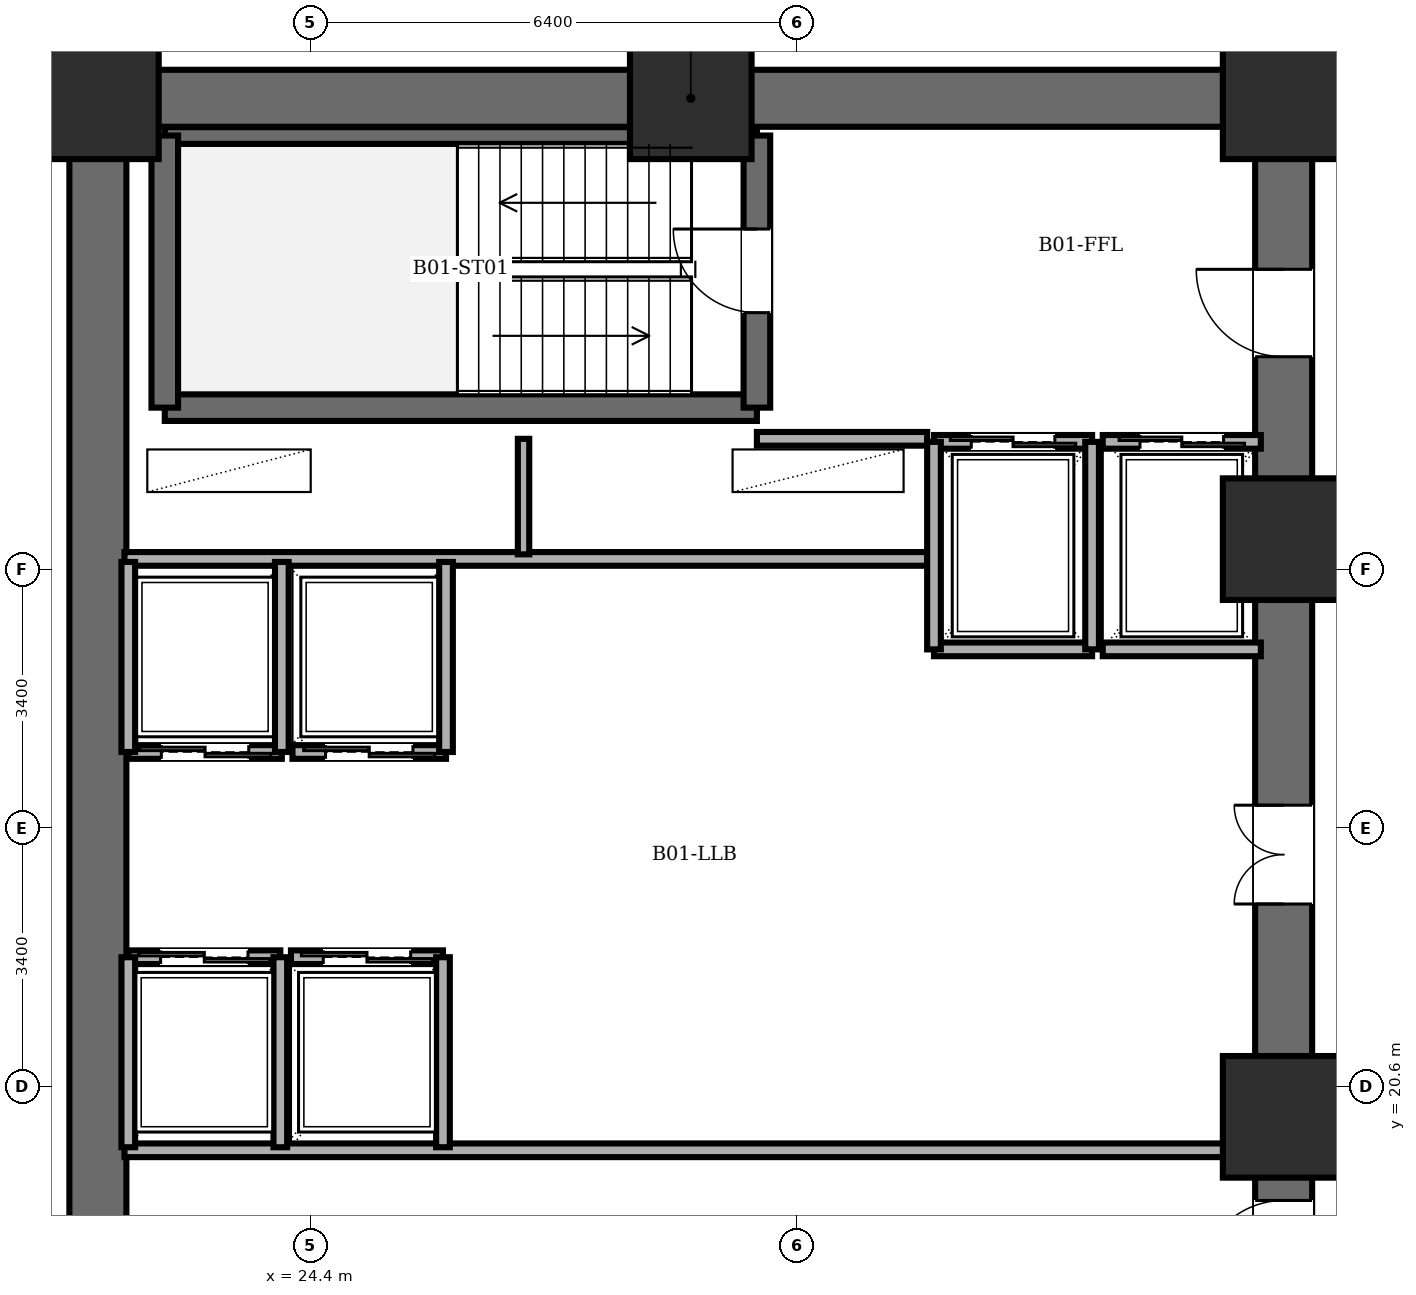
"""IFC4 building model, lengths in metres.
Left out: names, types, materials, properties, quantities, classifications, styles, units other than length and angle.
Written with IfcOpenShell. Run it as: python <this file> out.ifc"""

import sys

from ifc_helpers import new_model, si_unit, direction, frame, frame_2d, origin, origin_2d, place, context, subcontext, project, spatial, rectangle, extrude, element, fill, save


model = new_model("IFC4")
c1 = context("Model", 3, precision=1e-05, world=origin(), true_north=direction((0.0, 1.0)))
c2 = subcontext(c1, "Body", "Model", "MODEL_VIEW")
j1 = project(units=[si_unit("LENGTHUNIT", "METRE"), si_unit("PLANEANGLEUNIT", "RADIAN")], contexts=[c1])
p1 = place(None, origin())
s1 = spatial("IfcSite", under=j1, at=p1, CompositionType="ELEMENT")
p2 = place(p1, origin())
s2 = spatial("IfcBuilding", under=s1, at=p2, CompositionType="ELEMENT")
p3 = place(p2, frame((0.0, 0.0, -4.2)))
s3 = spatial("IfcBuildingStorey", under=s2, at=p3, CompositionType="ELEMENT", Elevation=-4.2)
for number, where, z_axis, x_axis in (
    (1, (37.2, 20.2, 0.0), (0.0, 0.0, 1.0), (1.0, 0.0, 0.0)),
    (2, (37.2, 27.8, 0.0), (0.0, 0.0, 1.0), (1.0, 0.0, 0.0)),
    (3, (37.2, 33.6, 0.0), (0.0, 0.0, 1.0), (1.0, 0.0, 0.0)),
    (4, (29.4, 33.6, 0.0), (0.0, 0.0, 1.0), (1.0, 0.0, 0.0)),
    (5, (21.6, 33.6, 0.0), (0.0, 0.0, 1.0), (1.0, 0.0, 0.0)),
):
    element("IfcColumn", number, at=place(p3, frame(where, z_axis=z_axis, x_axis=x_axis)), inside=s3, PredefinedType="COLUMN", context=c2, shape_type="SweptSolid", body=[
        extrude(rectangle(XDim=1.6, YDim=1.6, at=origin_2d()), origin(), (0.0, 0.0, 1.0), 4.2),
    ])
p4 = place(p3, frame((21.6, 14.4, 0.0), z_axis=(0.0, 0.0, 1.0), x_axis=(0.0, 1.0, 0.0)))
e6 = element("IfcWall", 6, at=p4, inside=s3, PredefinedType="SHEAR", context=c2, shape_type="SweptSolid", body=[
    extrude(rectangle(XDim=19.2, YDim=0.75, at=frame_2d((9.6, 0.0))), origin(), (0.0, 0.0, 1.0), 3.96),
])
p5 = place(p3, frame((21.6, 33.6, 0.0), z_axis=(0.0, 0.0, 1.0), x_axis=(1.0, 0.0, 0.0)))
e7 = element("IfcWall", 7, at=p5, inside=s3, PredefinedType="SHEAR", context=c2, shape_type="SweptSolid", body=[
    extrude(rectangle(XDim=15.6, YDim=0.75, at=frame_2d((7.8, 0.0))), origin(), (0.0, 0.0, 1.0), 3.96),
])
p6 = place(p3, frame((37.2, 14.4, 0.0), z_axis=(0.0, 0.0, 1.0), x_axis=(0.0, 1.0, 0.0)))
e8 = element("IfcWall", 8, at=p6, inside=s3, PredefinedType="SHEAR", context=c2, shape_type="SweptSolid", body=[
    extrude(rectangle(XDim=19.2, YDim=0.75, at=frame_2d((9.6, 0.0))), origin(), (0.0, 0.0, 1.0), 3.96),
])
p7 = place(p6, frame((15.8, 0.0, 0.0)))
e9 = element("IfcOpeningElement", 9, at=p7, cuts=e8, PredefinedType="OPENING", context=c2, shape_type="SweptSolid", body=[
    extrude(rectangle(XDim=1.15, YDim=2.15, at=frame_2d((0.575, 1.075))), frame((0.0, 0.385, 0.0), z_axis=(0.0, -1.0, 0.0), x_axis=(1.0, 0.0, 0.0)), (0.0, 0.0, 1.0), 0.77),
])
p8 = place(p6, frame((3.6, 0.0, 0.0)))
e10 = element("IfcOpeningElement", 10, at=p8, cuts=e8, PredefinedType="OPENING", context=c2, shape_type="SweptSolid", body=[
    extrude(rectangle(XDim=1.1, YDim=2.15, at=frame_2d((0.55, 1.075))), frame((0.0, 0.385, 0.0), z_axis=(0.0, -1.0, 0.0), x_axis=(1.0, 0.0, 0.0)), (0.0, 0.0, 1.0), 0.77),
])
p9 = place(p6, frame((8.6, 0.0, 0.0)))
e11 = element("IfcOpeningElement", 11, at=p9, cuts=e8, PredefinedType="OPENING", context=c2, shape_type="SweptSolid", body=[
    extrude(rectangle(XDim=1.3, YDim=2.2, at=frame_2d((0.65, 1.1))), frame((0.0, 0.385, 0.0), z_axis=(0.0, -1.0, 0.0), x_axis=(1.0, 0.0, 0.0)), (0.0, 0.0, 1.0), 0.77),
])
p10 = place(p3, frame((22.48, 29.53, 0.0), z_axis=(0.0, 0.0, 1.0), x_axis=(1.0, 0.0, 0.0)))
e12 = element("IfcWall", 12, at=p10, inside=s3, PredefinedType="SOLIDWALL", context=c2, shape_type="SweptSolid", body=[
    extrude(rectangle(XDim=7.79, YDim=0.35, at=frame_2d((3.895, 0.0))), origin(), (0.0, 0.0, 1.0), 3.96),
])
p11 = place(p3, frame((22.48, 33.11, 0.0), z_axis=(0.0, 0.0, 1.0), x_axis=(1.0, 0.0, 0.0)))
e13 = element("IfcWall", 13, at=p11, inside=s3, PredefinedType="PARTITIONING", context=c2, shape_type="SweptSolid", body=[
    extrude(rectangle(XDim=7.79, YDim=0.22, at=frame_2d((3.895, 0.0))), origin(), (0.0, 0.0, 1.0), 3.96),
])
p12 = place(p3, frame((22.48, 29.53, 0.0), z_axis=(0.0, 0.0, 1.0), x_axis=(0.0, 1.0, 0.0)))
e14 = element("IfcWall", 14, at=p12, inside=s3, PredefinedType="SOLIDWALL", context=c2, shape_type="SweptSolid", body=[
    extrude(rectangle(XDim=3.58, YDim=0.35, at=frame_2d((1.79, 0.0))), origin(), (0.0, 0.0, 1.0), 3.96),
])
p13 = place(p3, frame((30.27, 29.53, 0.0), z_axis=(0.0, 0.0, 1.0), x_axis=(0.0, 1.0, 0.0)))
e15 = element("IfcWall", 15, at=p13, inside=s3, PredefinedType="SOLIDWALL", context=c2, shape_type="SweptSolid", body=[
    extrude(rectangle(XDim=3.58, YDim=0.35, at=frame_2d((1.79, 0.0))), origin(), (0.0, 0.0, 1.0), 3.96),
])
p14 = place(p13, frame((1.25, 0.0, 0.0)))
e16 = element("IfcOpeningElement", 16, at=p14, cuts=e15, PredefinedType="OPENING", context=c2, shape_type="SweptSolid", body=[
    extrude(rectangle(XDim=1.1, YDim=2.15, at=frame_2d((0.55, 1.075))), frame((0.0, 0.185, 0.0), z_axis=(0.0, -1.0, 0.0), x_axis=(1.0, 0.0, 0.0)), (0.0, 0.0, 1.0), 0.37),
])
p15 = place(p3, frame((30.27, 29.12, 0.0), z_axis=(0.0, 0.0, 1.0), x_axis=(1.0, 0.0, 0.0)))
e17 = element("IfcWall", 17, at=p15, inside=s3, PredefinedType="PARTITIONING", context=c2, shape_type="SweptSolid", body=[
    extrude(rectangle(XDim=2.24, YDim=0.18, at=frame_2d((1.12, 0.0))), origin(), (0.0, 0.0, 1.0), 3.96),
])
p16 = place(p3, frame((21.95, 27.54, 0.0), z_axis=(0.0, 0.0, 1.0), x_axis=(1.0, 0.0, 0.0)))
e18 = element("IfcWall", 18, at=p16, inside=s3, PredefinedType="PARTITIONING", context=c2, shape_type="SweptSolid", body=[
    extrude(rectangle(XDim=10.56, YDim=0.18, at=frame_2d((5.28, 0.0))), origin(), (0.0, 0.0, 1.0), 3.96),
])
p17 = place(p3, frame((27.2, 27.6, 0.0), z_axis=(0.0, 0.0, 1.0), x_axis=(0.0, 1.0, 0.0)))
e19 = element("IfcWall", 19, at=p17, inside=s3, PredefinedType="PARTITIONING", context=c2, shape_type="SweptSolid", body=[
    extrude(rectangle(XDim=1.52, YDim=0.15, at=frame_2d((0.76, 0.0))), origin(), (0.0, 0.0, 1.0), 3.96),
])
p18 = place(p3, frame((21.95, 19.76, 0.0), z_axis=(0.0, 0.0, 1.0), x_axis=(1.0, 0.0, 0.0)))
e20 = element("IfcWall", 20, at=p18, inside=s3, PredefinedType="PARTITIONING", context=c2, shape_type="SweptSolid", body=[
    extrude(rectangle(XDim=14.87, YDim=0.18, at=frame_2d((7.435, 0.0))), origin(), (0.0, 0.0, 1.0), 3.96),
])
p19 = place(p3, frame((32.6, 29.08, 0.0), z_axis=(0.0, 0.0, 1.0), x_axis=(1.0, 0.0, 0.0)))
e21 = element("IfcWall", 21, at=p19, inside=s3, PredefinedType="PARTITIONING", context=c2, shape_type="SweptSolid", body=[
    extrude(rectangle(XDim=2.08, YDim=0.18, at=frame_2d((1.04, 0.0))), origin(), (0.0, 0.0, 1.0), 3.96),
])
p20 = place(p19, frame((0.49, 0.0, 0.0)))
e22 = element("IfcOpeningElement", 22, at=p20, cuts=e21, PredefinedType="OPENING", context=c2, shape_type="SweptSolid", body=[
    extrude(rectangle(XDim=1.1, YDim=2.2, at=frame_2d((0.55, 1.1))), frame((0.0, 0.1, 0.0), z_axis=(0.0, -1.0, 0.0), x_axis=(1.0, 0.0, 0.0)), (0.0, 0.0, 1.0), 0.2),
])
p21 = place(p3, frame((34.68, 26.35, 0.0), z_axis=(0.0, 0.0, 1.0), x_axis=(-1.0, 0.0, 0.0)))
e23 = element("IfcWall", 23, at=p21, inside=s3, PredefinedType="PARTITIONING", context=c2, shape_type="SweptSolid", body=[
    extrude(rectangle(XDim=2.08, YDim=0.18, at=frame_2d((1.04, 0.0))), origin(), (0.0, 0.0, 1.0), 3.96),
])
for number, where, z_axis, x_axis in (
    (24, (34.68, 26.35, 0.0), (0.0, 0.0, 1.0), (0.0, 1.0, 0.0)),
    (25, (32.6, 29.08, 0.0), (0.0, 0.0, 1.0), (0.0, -1.0, 0.0)),
):
    element("IfcWall", number, at=place(p3, frame(where, z_axis=z_axis, x_axis=x_axis)), inside=s3, PredefinedType="PARTITIONING", context=c2, shape_type="SweptSolid", body=[
        extrude(rectangle(XDim=2.73, YDim=0.18, at=frame_2d((1.365, 0.0))), origin(), (0.0, 0.0, 1.0), 3.96),
    ])
p22 = place(p3, frame((34.82, 29.08, 0.0), z_axis=(0.0, 0.0, 1.0), x_axis=(1.0, 0.0, 0.0)))
e26 = element("IfcWall", 26, at=p22, inside=s3, PredefinedType="PARTITIONING", context=c2, shape_type="SweptSolid", body=[
    extrude(rectangle(XDim=2.08, YDim=0.18, at=frame_2d((1.04, 0.0))), origin(), (0.0, 0.0, 1.0), 3.96),
])
p23 = place(p22, frame((0.49, 0.0, 0.0)))
e27 = element("IfcOpeningElement", 27, at=p23, cuts=e26, PredefinedType="OPENING", context=c2, shape_type="SweptSolid", body=[
    extrude(rectangle(XDim=1.1, YDim=2.2, at=frame_2d((0.55, 1.1))), frame((0.0, 0.1, 0.0), z_axis=(0.0, -1.0, 0.0), x_axis=(1.0, 0.0, 0.0)), (0.0, 0.0, 1.0), 0.2),
])
p24 = place(p3, frame((36.9, 26.35, 0.0), z_axis=(0.0, 0.0, 1.0), x_axis=(-1.0, 0.0, 0.0)))
e28 = element("IfcWall", 28, at=p24, inside=s3, PredefinedType="PARTITIONING", context=c2, shape_type="SweptSolid", body=[
    extrude(rectangle(XDim=2.08, YDim=0.18, at=frame_2d((1.04, 0.0))), origin(), (0.0, 0.0, 1.0), 3.96),
])
p25 = place(p3, frame((24.02, 25.0, 0.0), z_axis=(0.0, 0.0, 1.0), x_axis=(-1.0, 0.0, 0.0)))
e29 = element("IfcWall", 29, at=p25, inside=s3, PredefinedType="PARTITIONING", context=c2, shape_type="SweptSolid", body=[
    extrude(rectangle(XDim=2.02, YDim=0.18, at=frame_2d((1.01, 0.0))), origin(), (0.0, 0.0, 1.0), 3.96),
])
p26 = place(p25, frame((0.435, 0.0, 0.0)))
e30 = element("IfcOpeningElement", 30, at=p26, cuts=e29, PredefinedType="OPENING", context=c2, shape_type="SweptSolid", body=[
    extrude(rectangle(XDim=1.15, YDim=2.2, at=frame_2d((0.575, 1.1))), frame((0.0, 0.1, 0.0), z_axis=(0.0, -1.0, 0.0), x_axis=(1.0, 0.0, 0.0)), (0.0, 0.0, 1.0), 0.2),
])
for number, where, z_axis, x_axis in (
    (31, (24.02, 25.0, 0.0), (0.0, 0.0, 1.0), (0.0, 1.0, 0.0)),
    (32, (22.0, 27.5, 0.0), (0.0, 0.0, 1.0), (0.0, -1.0, 0.0)),
):
    element("IfcWall", number, at=place(p3, frame(where, z_axis=z_axis, x_axis=x_axis)), inside=s3, PredefinedType="PARTITIONING", context=c2, shape_type="SweptSolid", body=[
        extrude(rectangle(XDim=2.5, YDim=0.18, at=frame_2d((1.25, 0.0))), origin(), (0.0, 0.0, 1.0), 3.96),
    ])
p27 = place(p3, frame((26.18, 25.0, 0.0), z_axis=(0.0, 0.0, 1.0), x_axis=(-1.0, 0.0, 0.0)))
e33 = element("IfcWall", 33, at=p27, inside=s3, PredefinedType="PARTITIONING", context=c2, shape_type="SweptSolid", body=[
    extrude(rectangle(XDim=2.02, YDim=0.18, at=frame_2d((1.01, 0.0))), origin(), (0.0, 0.0, 1.0), 3.96),
])
p28 = place(p27, frame((0.435, 0.0, 0.0)))
e34 = element("IfcOpeningElement", 34, at=p28, cuts=e33, PredefinedType="OPENING", context=c2, shape_type="SweptSolid", body=[
    extrude(rectangle(XDim=1.15, YDim=2.2, at=frame_2d((0.575, 1.1))), frame((0.0, 0.1, 0.0), z_axis=(0.0, -1.0, 0.0), x_axis=(1.0, 0.0, 0.0)), (0.0, 0.0, 1.0), 0.2),
])
p29 = place(p3, frame((26.18, 25.0, 0.0), z_axis=(0.0, 0.0, 1.0), x_axis=(0.0, 1.0, 0.0)))
e35 = element("IfcWall", 35, at=p29, inside=s3, PredefinedType="PARTITIONING", context=c2, shape_type="SweptSolid", body=[
    extrude(rectangle(XDim=2.5, YDim=0.18, at=frame_2d((1.25, 0.0))), origin(), (0.0, 0.0, 1.0), 3.96),
])
p30 = place(p3, frame((22.0, 22.3, 0.0), z_axis=(0.0, 0.0, 1.0), x_axis=(1.0, 0.0, 0.0)))
e36 = element("IfcWall", 36, at=p30, inside=s3, PredefinedType="PARTITIONING", context=c2, shape_type="SweptSolid", body=[
    extrude(rectangle(XDim=2.0, YDim=0.18, at=frame_2d((1.0, 0.0))), origin(), (0.0, 0.0, 1.0), 3.96),
])
p31 = place(p30, frame((0.425, 0.0, 0.0)))
e37 = element("IfcOpeningElement", 37, at=p31, cuts=e36, PredefinedType="OPENING", context=c2, shape_type="SweptSolid", body=[
    extrude(rectangle(XDim=1.15, YDim=2.2, at=frame_2d((0.575, 1.1))), frame((0.0, 0.1, 0.0), z_axis=(0.0, -1.0, 0.0), x_axis=(1.0, 0.0, 0.0)), (0.0, 0.0, 1.0), 0.2),
])
for number, where, z_axis, x_axis in (
    (38, (24.0, 19.8, 0.0), (0.0, 0.0, 1.0), (0.0, 1.0, 0.0)),
    (39, (22.0, 22.3, 0.0), (0.0, 0.0, 1.0), (0.0, -1.0, 0.0)),
):
    element("IfcWall", number, at=place(p3, frame(where, z_axis=z_axis, x_axis=x_axis)), inside=s3, PredefinedType="PARTITIONING", context=c2, shape_type="SweptSolid", body=[
        extrude(rectangle(XDim=2.5, YDim=0.18, at=frame_2d((1.25, 0.0))), origin(), (0.0, 0.0, 1.0), 3.96),
    ])
p32 = place(p3, frame((24.14, 22.3, 0.0), z_axis=(0.0, 0.0, 1.0), x_axis=(1.0, 0.0, 0.0)))
e40 = element("IfcWall", 40, at=p32, inside=s3, PredefinedType="PARTITIONING", context=c2, shape_type="SweptSolid", body=[
    extrude(rectangle(XDim=2.0, YDim=0.18, at=frame_2d((1.0, 0.0))), origin(), (0.0, 0.0, 1.0), 3.96),
])
p33 = place(p32, frame((0.425, 0.0, 0.0)))
e41 = element("IfcOpeningElement", 41, at=p33, cuts=e40, PredefinedType="OPENING", context=c2, shape_type="SweptSolid", body=[
    extrude(rectangle(XDim=1.15, YDim=2.2, at=frame_2d((0.575, 1.1))), frame((0.0, 0.1, 0.0), z_axis=(0.0, -1.0, 0.0), x_axis=(1.0, 0.0, 0.0)), (0.0, 0.0, 1.0), 0.2),
])
p34 = place(p3, frame((26.14, 19.8, 0.0), z_axis=(0.0, 0.0, 1.0), x_axis=(0.0, 1.0, 0.0)))
e42 = element("IfcWall", 42, at=p34, inside=s3, PredefinedType="PARTITIONING", context=c2, shape_type="SweptSolid", body=[
    extrude(rectangle(XDim=2.5, YDim=0.18, at=frame_2d((1.25, 0.0))), origin(), (0.0, 0.0, 1.0), 3.96),
])
p35 = place(p14, origin())
e43 = element("IfcDoor", 43, at=p35, inside=s3, OperationType="SINGLE_SWING_RIGHT", PredefinedType="DOOR", context=c2, shape_type="SweptSolid", body=[
    extrude(rectangle(XDim=1.1, YDim=2.15, at=frame_2d((0.55, 1.075))), frame((0.0, 0.025, 0.0), z_axis=(0.0, -1.0, 0.0), x_axis=(1.0, 0.0, 0.0)), (0.0, 0.0, 1.0), 0.05),
])
fill(e16, e43)
p36 = place(p7, origin())
e44 = element("IfcDoor", 44, at=p36, inside=s3, OperationType="SINGLE_SWING_RIGHT", PredefinedType="DOOR", context=c2, shape_type="SweptSolid", body=[
    extrude(rectangle(XDim=1.15, YDim=2.15, at=frame_2d((0.575, 1.075))), frame((0.0, 0.025, 0.0), z_axis=(0.0, -1.0, 0.0), x_axis=(1.0, 0.0, 0.0)), (0.0, 0.0, 1.0), 0.05),
])
fill(e9, e44)
p37 = place(p8, origin())
e45 = element("IfcDoor", 45, at=p37, inside=s3, OperationType="SINGLE_SWING_LEFT", PredefinedType="DOOR", context=c2, shape_type="SweptSolid", body=[
    extrude(rectangle(XDim=1.1, YDim=2.15, at=frame_2d((0.55, 1.075))), frame((0.0, 0.025, 0.0), z_axis=(0.0, -1.0, 0.0), x_axis=(1.0, 0.0, 0.0)), (0.0, 0.0, 1.0), 0.05),
])
fill(e10, e45)
p38 = place(p20, origin())
e46 = element("IfcDoor", 46, at=p38, inside=s3, OperationType="DOUBLE_DOOR_SLIDING", PredefinedType="DOOR", context=c2, shape_type="SweptSolid", body=[
    extrude(rectangle(XDim=1.1, YDim=2.2, at=frame_2d((0.55, 1.1))), frame((0.0, 0.025, 0.0), z_axis=(0.0, -1.0, 0.0), x_axis=(1.0, 0.0, 0.0)), (0.0, 0.0, 1.0), 0.05),
])
fill(e22, e46)
p39 = place(p23, origin())
e47 = element("IfcDoor", 47, at=p39, inside=s3, OperationType="DOUBLE_DOOR_SLIDING", PredefinedType="DOOR", context=c2, shape_type="SweptSolid", body=[
    extrude(rectangle(XDim=1.1, YDim=2.2, at=frame_2d((0.55, 1.1))), frame((0.0, 0.025, 0.0), z_axis=(0.0, -1.0, 0.0), x_axis=(1.0, 0.0, 0.0)), (0.0, 0.0, 1.0), 0.05),
])
fill(e27, e47)
p40 = place(p26, origin())
e48 = element("IfcDoor", 48, at=p40, inside=s3, OperationType="DOUBLE_DOOR_SLIDING", PredefinedType="DOOR", context=c2, shape_type="SweptSolid", body=[
    extrude(rectangle(XDim=1.15, YDim=2.2, at=frame_2d((0.575, 1.1))), frame((0.0, 0.025, 0.0), z_axis=(0.0, -1.0, 0.0), x_axis=(1.0, 0.0, 0.0)), (0.0, 0.0, 1.0), 0.05),
])
fill(e30, e48)
p41 = place(p28, origin())
e49 = element("IfcDoor", 49, at=p41, inside=s3, OperationType="DOUBLE_DOOR_SLIDING", PredefinedType="DOOR", context=c2, shape_type="SweptSolid", body=[
    extrude(rectangle(XDim=1.15, YDim=2.2, at=frame_2d((0.575, 1.1))), frame((0.0, 0.025, 0.0), z_axis=(0.0, -1.0, 0.0), x_axis=(1.0, 0.0, 0.0)), (0.0, 0.0, 1.0), 0.05),
])
fill(e34, e49)
p42 = place(p31, origin())
e50 = element("IfcDoor", 50, at=p42, inside=s3, OperationType="DOUBLE_DOOR_SLIDING", PredefinedType="DOOR", context=c2, shape_type="SweptSolid", body=[
    extrude(rectangle(XDim=1.15, YDim=2.2, at=frame_2d((0.575, 1.1))), frame((0.0, 0.025, 0.0), z_axis=(0.0, -1.0, 0.0), x_axis=(1.0, 0.0, 0.0)), (0.0, 0.0, 1.0), 0.05),
])
fill(e37, e50)
p43 = place(p33, origin())
e51 = element("IfcDoor", 51, at=p43, inside=s3, OperationType="DOUBLE_DOOR_SLIDING", PredefinedType="DOOR", context=c2, shape_type="SweptSolid", body=[
    extrude(rectangle(XDim=1.15, YDim=2.2, at=frame_2d((0.575, 1.1))), frame((0.0, 0.025, 0.0), z_axis=(0.0, -1.0, 0.0), x_axis=(1.0, 0.0, 0.0)), (0.0, 0.0, 1.0), 0.05),
])
fill(e41, e51)
p44 = place(p9, origin())
e52 = element("IfcDoor", 52, at=p44, inside=s3, OperationType="DOUBLE_DOOR_SINGLE_SWING", PredefinedType="DOOR", context=c2, shape_type="SweptSolid", body=[
    extrude(rectangle(XDim=1.3, YDim=2.2, at=frame_2d((0.65, 1.1))), frame((0.0, 0.025, 0.0), z_axis=(0.0, -1.0, 0.0), x_axis=(1.0, 0.0, 0.0)), (0.0, 0.0, 1.0), 0.05),
])
fill(e11, e52)
save(model, sys.argv[1])
